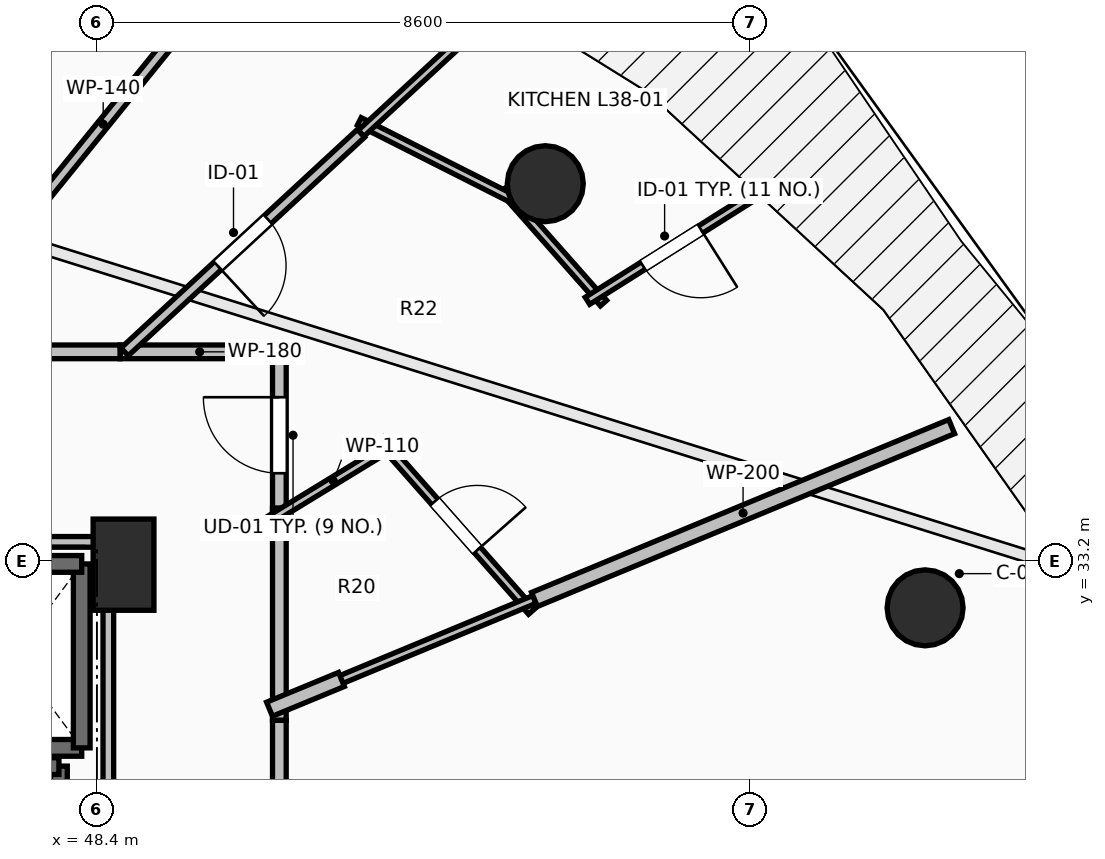
"""IFC4 building model, lengths in metres.
Left out: names, types, materials, properties, quantities, classifications, styles, units other than length and angle.
Written with IfcOpenShell. Run it as: python <this file> out.ifc"""

import sys

from ifc_helpers import new_model, si_unit, direction, frame, frame_2d, origin, origin_2d, place, context, subcontext, project, spatial, rectangle, circle, extrude, element, fill, save


model = new_model("IFC4")
c1 = context("Model", 3, precision=1e-05, world=origin(), true_north=direction((0.0, 1.0)))
c2 = subcontext(c1, "Body", "Model", "MODEL_VIEW")
j1 = project(units=[si_unit("LENGTHUNIT", "METRE"), si_unit("PLANEANGLEUNIT", "RADIAN")], contexts=[c1])
p1 = place(None, origin())
s1 = spatial("IfcSite", under=j1, at=p1, CompositionType="ELEMENT")
p2 = place(p1, origin())
s2 = spatial("IfcBuilding", under=s1, at=p2, CompositionType="ELEMENT")
p3 = place(p2, frame((0.0, 0.0, 143.1)))
s3 = spatial("IfcBuildingStorey", under=s2, at=p3, CompositionType="ELEMENT", Elevation=143.1)
for number, where, z_axis, x_axis in (
    (1, (59.295, 32.582, 0.0), (0.0, 0.0, 1.0), (0.924, 0.383, 0.0)),
    (2, (54.299, 38.162, 0.0), (0.0, 0.0, 1.0), (0.707, 0.707, 0.0)),
):
    element("IfcColumn", number, at=place(p3, frame(where, z_axis=z_axis, x_axis=x_axis)), inside=s3, PredefinedType="COLUMN", context=c2, shape_type="SweptSolid", body=[
        extrude(circle(Radius=0.5, at=origin_2d()), origin(), (0.0, 0.0, 1.0), 3.5),
    ])
p4 = place(p3, frame((48.75, 33.15, 0.0), z_axis=(0.0, 0.0, 1.0), x_axis=(1.0, 0.0, 0.0)))
e3 = element("IfcColumn", 3, at=p4, inside=s3, PredefinedType="PILASTER", context=c2, shape_type="SweptSolid", body=[
    extrude(rectangle(XDim=0.8, YDim=1.2, at=origin_2d()), origin(), (0.0, 0.0, 1.0), 3.5),
])
p5 = place(p3, frame((46.4, 30.74, 0.0), z_axis=(0.0, 0.0, 1.0), x_axis=(1.0, 0.0, 0.0)))
e4 = element("IfcWall", 4, at=p5, inside=s3, PredefinedType="SOLIDWALL", context=c2, shape_type="SweptSolid", body=[
    extrude(rectangle(XDim=1.8, YDim=0.22, at=frame_2d((0.9, 0.0))), origin(), (0.0, 0.0, 1.0), 3.24),
])
p6 = place(p3, frame((48.2, 30.74, 0.0), z_axis=(0.0, 0.0, 1.0), x_axis=(0.0, 1.0, 0.0)))
e5 = element("IfcWall", 5, at=p6, inside=s3, PredefinedType="SOLIDWALL", context=c2, shape_type="SweptSolid", body=[
    extrude(rectangle(XDim=2.42, YDim=0.22, at=frame_2d((1.21, 0.0))), origin(), (0.0, 0.0, 1.0), 3.24),
])
p7 = place(p3, frame((48.2, 33.16, 0.0), z_axis=(0.0, 0.0, 1.0), x_axis=(-1.0, 0.0, 0.0)))
e6 = element("IfcWall", 6, at=p7, inside=s3, PredefinedType="SOLIDWALL", context=c2, shape_type="SweptSolid", body=[
    extrude(rectangle(XDim=1.8, YDim=0.22, at=frame_2d((0.9, 0.0))), origin(), (0.0, 0.0, 1.0), 3.24),
])
p8 = place(p3, frame((47.9, 28.0, 0.0), z_axis=(0.0, 0.0, 1.0), x_axis=(0.0, 1.0, 0.0)))
e7 = element("IfcWall", 7, at=p8, inside=s3, PredefinedType="SHEAR", context=c2, shape_type="SweptSolid", body=[
    extrude(rectangle(XDim=2.5, YDim=0.22, at=frame_2d((1.25, 0.0))), origin(), (0.0, 0.0, 1.0), 3.24),
])
p9 = place(p3, frame((47.9, 30.5, 0.0), z_axis=(0.0, 0.0, 1.0), x_axis=(-1.0, 0.0, 0.0)))
e8 = element("IfcWall", 8, at=p9, inside=s3, PredefinedType="SHEAR", context=c2, shape_type="SweptSolid", body=[
    extrude(rectangle(XDim=2.4, YDim=0.22, at=frame_2d((1.2, 0.0))), origin(), (0.0, 0.0, 1.0), 3.24),
])
p10 = place(p3, frame((50.8, 33.756, 0.0), z_axis=(0.0, 0.0, 1.0), x_axis=(0.0, 1.0, 0.0)))
e9 = element("IfcWall", 9, at=p10, inside=s3, PredefinedType="PARTITIONING", context=c2, shape_type="SweptSolid", body=[
    extrude(rectangle(XDim=2.194, YDim=0.18, at=frame_2d((1.097, 0.0))), origin(), (0.0, 0.0, 1.0), 2.432),
])
p11 = place(p10, frame((0.597, 0.0, 0.0)))
e10 = element("IfcOpeningElement", 10, at=p11, cuts=e9, PredefinedType="OPENING", context=c2, shape_type="SweptSolid", body=[
    extrude(rectangle(XDim=1.0, YDim=2.15, at=frame_2d((0.5, 1.075))), frame((0.0, 0.105, 0.0), z_axis=(0.0, -1.0, 0.0), x_axis=(1.0, 0.0, 0.0)), (0.0, 0.0, 1.0), 0.21),
])
p12 = place(p3, frame((50.8, 35.95, 0.0), z_axis=(0.0, 0.0, 1.0), x_axis=(-1.0, 0.0, 0.0)))
e11 = element("IfcWall", 11, at=p12, inside=s3, PredefinedType="PARTITIONING", context=c2, shape_type="SweptSolid", body=[
    extrude(rectangle(XDim=2.096, YDim=0.18, at=frame_2d((1.048, 0.0))), origin(), (0.0, 0.0, 1.0), 2.972),
])
p13 = place(p3, frame((50.8, 31.102, 0.0), z_axis=(0.0, 0.0, 1.0), x_axis=(0.0, 1.0, 0.0)))
e12 = element("IfcWall", 12, at=p13, inside=s3, PredefinedType="PARTITIONING", context=c2, shape_type="SweptSolid", body=[
    extrude(rectangle(XDim=2.794, YDim=0.18, at=frame_2d((1.397, 0.0))), origin(), (0.0, 0.0, 1.0), 2.432),
])
p14 = place(p3, frame((48.704, 35.95, 0.0), z_axis=(0.0, 0.0, 1.0), x_axis=(-1.0, 0.0, 0.0)))
e13 = element("IfcWall", 13, at=p14, inside=s3, PredefinedType="PARTITIONING", context=c2, shape_type="SweptSolid", body=[
    extrude(rectangle(XDim=2.707, YDim=0.18, at=frame_2d((1.354, 0.0))), origin(), (0.0, 0.0, 1.0), 2.432),
])
p15 = place(p3, frame((50.8, 27.25, 0.0), z_axis=(0.0, 0.0, 1.0), x_axis=(0.0, 1.0, 0.0)))
e14 = element("IfcWall", 14, at=p15, inside=s3, PredefinedType="PARTITIONING", context=c2, shape_type="SweptSolid", body=[
    extrude(rectangle(XDim=3.852, YDim=0.18, at=frame_2d((1.926, 0.0))), origin(), (0.0, 0.0, 1.0), 2.432),
])
p16 = place(p3, frame((50.68, 33.743, 0.0), z_axis=(0.0, 0.0, 1.0), x_axis=(0.853368681548, 0.52130786811, 0.0)))
e15 = element("IfcWall", 15, at=p16, inside=s3, PredefinedType="PARTITIONING", context=c2, shape_type="SweptSolid", body=[
    extrude(rectangle(XDim=1.945, YDim=0.11, at=frame_2d((0.973, 0.0))), origin(), (0.0, 0.0, 1.0), 2.972),
])
p17 = place(p3, frame((52.128, 34.789, 0.0), z_axis=(0.0, 0.0, 1.0), x_axis=(0.66196248337, -0.74953697081, 0.0)))
e16 = element("IfcWall", 16, at=p17, inside=s3, PredefinedType="PARTITIONING", context=c2, shape_type="SweptSolid", body=[
    extrude(rectangle(XDim=3.008, YDim=0.11, at=frame_2d((1.504, 0.0))), origin(), (0.0, 0.0, 1.0), 2.432),
])
p18 = place(p17, frame((1.079, 0.0, 0.0)))
e17 = element("IfcOpeningElement", 17, at=p18, cuts=e16, PredefinedType="OPENING", context=c2, shape_type="SweptSolid", body=[
    extrude(rectangle(XDim=0.85, YDim=2.1, at=frame_2d((0.425, 1.05))), frame((0.0, 0.07, 0.0), z_axis=(0.0, -1.0, 0.0), x_axis=(1.0, 0.0, 0.0)), (0.0, 0.0, 1.0), 0.14),
])
p19 = place(p3, frame((54.156, 32.693, 0.0), z_axis=(0.0, 0.0, 1.0), x_axis=(-0.923770555063, -0.382946421316, 0.0)))
e18 = element("IfcWall", 18, at=p19, inside=s3, PredefinedType="PARTITIONING", context=c2, shape_type="SweptSolid", body=[
    extrude(rectangle(XDim=2.889, YDim=0.11, at=frame_2d((1.444, 0.0))), origin(), (0.0, 0.0, 1.0), 2.432),
])
p20 = place(p3, frame((55.065, 36.591, 0.0), z_axis=(0.0, 0.0, 1.0), x_axis=(-0.66216897397, 0.749354555542, 0.0)))
e19 = element("IfcWall", 19, at=p20, inside=s3, PredefinedType="PARTITIONING", context=c2, shape_type="SweptSolid", body=[
    extrude(rectangle(XDim=1.991, YDim=0.11, at=frame_2d((0.996, 0.0))), origin(), (0.0, 0.0, 1.0), 2.432),
])
p21 = place(p3, frame((53.964, 37.915, 0.0), z_axis=(0.0, 0.0, 1.0), x_axis=(-0.89250004606, 0.451047301049, 0.0)))
e20 = element("IfcWall", 20, at=p21, inside=s3, PredefinedType="PARTITIONING", context=c2, shape_type="SweptSolid", body=[
    extrude(rectangle(XDim=2.366, YDim=0.11, at=frame_2d((1.183, 0.0))), origin(), (0.0, 0.0, 1.0), 2.432),
])
p22 = place(p3, frame((51.874, 38.824, 0.0), z_axis=(0.0, 0.0, 1.0), x_axis=(0.734191073284, 0.678942904749, 0.0)))
e21 = element("IfcWall", 21, at=p22, inside=s3, PredefinedType="PARTITIONING", context=c2, shape_type="SweptSolid", body=[
    extrude(rectangle(XDim=2.523, YDim=0.11, at=frame_2d((1.262, 0.0))), origin(), (0.0, 0.0, 1.0), 2.728),
])
p23 = place(p3, frame((57.075, 38.021, 0.0), z_axis=(0.0, 0.0, 1.0), x_axis=(-0.846034075758, -0.533128823697, 0.0)))
e22 = element("IfcWall", 22, at=p23, inside=s3, PredefinedType="PARTITIONING", context=c2, shape_type="SweptSolid", body=[
    extrude(rectangle(XDim=2.626, YDim=0.11, at=frame_2d((1.313, 0.0))), origin(), (0.0, 0.0, 1.0), 2.728),
])
p24 = place(p23, frame((0.863, 0.0, 0.0)))
e23 = element("IfcOpeningElement", 23, at=p24, cuts=e22, PredefinedType="OPENING", context=c2, shape_type="SweptSolid", body=[
    extrude(rectangle(XDim=0.9, YDim=2.1, at=frame_2d((0.45, 1.05))), frame((0.0, 0.07, 0.0), z_axis=(0.0, -1.0, 0.0), x_axis=(1.0, 0.0, 0.0)), (0.0, 0.0, 1.0), 0.14),
])
p25 = place(p3, frame((51.874, 38.824, 0.0), z_axis=(0.0, 0.0, 1.0), x_axis=(-0.734347971597, -0.678773199685, 0.0)))
e24 = element("IfcWall", 24, at=p25, inside=s3, PredefinedType="PARTITIONING", context=c2, shape_type="SweptSolid", body=[
    extrude(rectangle(XDim=4.235, YDim=0.14, at=frame_2d((2.117, 0.0))), origin(), (0.0, 0.0, 1.0), 2.922),
])
p26 = place(p25, frame((1.667, 0.0, 0.0)))
e25 = element("IfcOpeningElement", 25, at=p26, cuts=e24, PredefinedType="OPENING", context=c2, shape_type="SweptSolid", body=[
    extrude(rectangle(XDim=0.9, YDim=2.1, at=frame_2d((0.45, 1.05))), frame((0.0, 0.085, 0.0), z_axis=(0.0, -1.0, 0.0), x_axis=(1.0, 0.0, 0.0)), (0.0, 0.0, 1.0), 0.17),
])
p27 = place(p3, frame((54.156, 32.692, 0.0), z_axis=(0.0, 0.0, 1.0), x_axis=(0.923849528339, 0.382755860814, 0.0)))
e26 = element("IfcWall", 26, at=p27, inside=s3, PredefinedType="PARTITIONING", context=c2, shape_type="SweptSolid", body=[
    extrude(rectangle(XDim=5.941, YDim=0.2, at=frame_2d((2.97, 0.0))), origin(), (0.0, 0.0, 1.0), 2.432),
])
p28 = place(p3, frame((50.671, 31.249, 0.0), z_axis=(0.0, 0.0, 1.0), x_axis=(0.924089428906, 0.38217630406, 0.0)))
e27 = element("IfcWall", 27, at=p28, inside=s3, PredefinedType="PARTITIONING", context=c2, shape_type="SweptSolid", body=[
    extrude(rectangle(XDim=1.024, YDim=0.2, at=frame_2d((0.512, 0.0))), origin(), (0.0, 0.0, 1.0), 3.24),
])
p29 = place(p3, frame((50.908, 41.94, 0.0), z_axis=(0.0, 0.0, 1.0), x_axis=(-0.62935766896, -0.77711577292, 0.0)))
e28 = element("IfcWall", 28, at=p29, inside=s3, PredefinedType="PARTITIONING", context=c2, shape_type="SweptSolid", body=[
    extrude(rectangle(XDim=7.708, YDim=0.14, at=frame_2d((3.854, 0.0))), origin(), (0.0, 0.0, 1.0), 2.432),
])
p30 = place(p3, frame((48.148, 43.057, 0.0), z_axis=(0.0, 0.0, 1.0), x_axis=(-0.511279346901, -0.859414585304, 0.0)))
e29 = element("IfcWall", 29, at=p30, inside=s3, PredefinedType="PARTITIONING", context=c2, shape_type="SweptSolid", body=[
    extrude(rectangle(XDim=8.27, YDim=0.14, at=frame_2d((4.135, 0.0))), origin(), (0.0, 0.0, 1.0), 2.432),
])
p31 = place(p3, frame((48.55, 28.196, 0.0), z_axis=(0.0, 0.0, 1.0), x_axis=(0.0, 1.0, 0.0)))
e30 = element("IfcWall", 30, at=p31, inside=s3, PredefinedType="PARTITIONING", context=c2, shape_type="SweptSolid", body=[
    extrude(rectangle(XDim=5.254, YDim=0.14, at=frame_2d((2.627, 0.0))), origin(), (0.0, 0.0, 1.0), 2.432),
])
p32 = place(p3, frame((48.55, 33.45, 0.0), z_axis=(0.0, 0.0, 1.0), x_axis=(-1.0, 0.0, 0.0)))
e31 = element("IfcWall", 31, at=p32, inside=s3, PredefinedType="PARTITIONING", context=c2, shape_type="SweptSolid", body=[
    extrude(rectangle(XDim=4.21, YDim=0.14, at=frame_2d((2.105, 0.0))), origin(), (0.0, 0.0, 1.0), 2.432),
])
p33 = place(p11, origin())
e32 = element("IfcDoor", 32, at=p33, inside=s3, OperationType="SINGLE_SWING_RIGHT", PredefinedType="DOOR", context=c2, shape_type="SweptSolid", body=[
    extrude(rectangle(XDim=1.0, YDim=2.15, at=frame_2d((0.5, 1.075))), frame((0.0, 0.025, 0.0), z_axis=(0.0, -1.0, 0.0), x_axis=(1.0, 0.0, 0.0)), (0.0, 0.0, 1.0), 0.05),
])
fill(e10, e32)
p34 = place(p18, origin())
e33 = element("IfcDoor", 33, at=p34, inside=s3, OperationType="SINGLE_SWING_RIGHT", PredefinedType="DOOR", context=c2, shape_type="SweptSolid", body=[
    extrude(rectangle(XDim=0.85, YDim=2.1, at=frame_2d((0.425, 1.05))), frame((0.0, 0.025, 0.0), z_axis=(0.0, -1.0, 0.0), x_axis=(1.0, 0.0, 0.0)), (0.0, 0.0, 1.0), 0.05),
])
fill(e17, e33)
p35 = place(p24, origin())
e34 = element("IfcDoor", 34, at=p35, inside=s3, OperationType="SINGLE_SWING_LEFT", PredefinedType="DOOR", context=c2, shape_type="SweptSolid", body=[
    extrude(rectangle(XDim=0.9, YDim=2.1, at=frame_2d((0.45, 1.05))), frame((0.0, 0.025, 0.0), z_axis=(0.0, -1.0, 0.0), x_axis=(1.0, 0.0, 0.0)), (0.0, 0.0, 1.0), 0.05),
])
fill(e23, e34)
p36 = place(p26, origin())
e35 = element("IfcDoor", 35, at=p36, inside=s3, OperationType="SINGLE_SWING_RIGHT", PredefinedType="DOOR", context=c2, shape_type="SweptSolid", body=[
    extrude(rectangle(XDim=0.9, YDim=2.1, at=frame_2d((0.45, 1.05))), frame((0.0, 0.025, 0.0), z_axis=(0.0, -1.0, 0.0), x_axis=(1.0, 0.0, 0.0)), (0.0, 0.0, 1.0), 0.05),
])
fill(e25, e35)
save(model, sys.argv[1])
